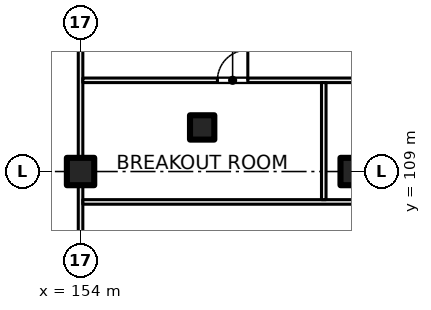
"""IFC4 building model, lengths in metres.
Left out: names, types, materials, properties, quantities, classifications, styles, units other than length and angle.
Written with IfcOpenShell. Run it as: python <this file> out.ifc"""

import sys

from ifc_helpers import new_model, si_unit, direction, frame, frame_2d, origin, origin_2d, place, context, subcontext, project, spatial, rectangle, extrude, element, fill, save


model = new_model("IFC4")
c1 = context("Model", 3, precision=1e-05, world=origin(), true_north=direction((0.0, 1.0)))
c2 = subcontext(c1, "Body", "Model", "MODEL_VIEW")
j1 = project(units=[si_unit("LENGTHUNIT", "METRE"), si_unit("PLANEANGLEUNIT", "RADIAN")], contexts=[c1])
p1 = place(None, origin())
s1 = spatial("IfcSite", under=j1, at=p1, CompositionType="ELEMENT")
p2 = place(p1, origin())
s2 = spatial("IfcBuilding", under=s1, at=p2, CompositionType="ELEMENT")
p3 = place(p2, frame((0.0, 0.0, 22.5)))
s3 = spatial("IfcBuildingStorey", under=s2, at=p3, CompositionType="ELEMENT", Elevation=22.5)
for number, where, z_axis, x_axis in (
    (1, (154.0, 109.0, 0.0), (0.0, 0.0, 1.0), (1.0, 0.0, 0.0)),
    (2, (163.0, 109.0, 0.0), (0.0, 0.0, 1.0), (1.0, 0.0, 0.0)),
):
    element("IfcColumn", number, at=place(p3, frame(where, z_axis=z_axis, x_axis=x_axis)), inside=s3, PredefinedType="COLUMN", context=c2, shape_type="SweptSolid", body=[
        extrude(rectangle(XDim=0.9, YDim=0.9, at=origin_2d()), origin(), (0.0, 0.0, 1.0), 5.0),
    ])
p4 = place(p3, frame((158.0, 110.45, 0.0), z_axis=(0.0, 0.0, 1.0), x_axis=(1.0, 0.0, 0.0)))
e3 = element("IfcColumn", 3, at=p4, inside=s3, PredefinedType="COLUMN", context=c2, shape_type="SweptSolid", body=[
    extrude(rectangle(XDim=0.8, YDim=0.8, at=origin_2d()), origin(), (0.0, 0.0, 1.0), 5.0),
])
p5 = place(p3, frame((154.0, 103.075, 0.0), z_axis=(0.0, 0.0, 1.0), x_axis=(0.0, 1.0, 0.0)))
e4 = element("IfcWall", 4, at=p5, inside=s3, PredefinedType="PARTITIONING", context=c2, shape_type="SweptSolid", body=[
    extrude(rectangle(XDim=13.925, YDim=0.15, at=frame_2d((6.962, 0.0))), origin(), (0.0, 0.0, 1.0), 4.625),
])
p6 = place(p3, frame((154.075, 108.0, 0.0), z_axis=(0.0, 0.0, 1.0), x_axis=(1.0, 0.0, 0.0)))
e5 = element("IfcWall", 5, at=p6, inside=s3, PredefinedType="PARTITIONING", context=c2, shape_type="SweptSolid", body=[
    extrude(rectangle(XDim=18.557, YDim=0.15, at=frame_2d((9.279, 0.0))), origin(), (0.0, 0.0, 1.0), 4.625),
])
p7 = place(p3, frame((167.002, 112.0, 0.0), z_axis=(0.0, 0.0, 1.0), x_axis=(-1.0, 0.0, 0.0)))
e6 = element("IfcWall", 6, at=p7, inside=s3, PredefinedType="PARTITIONING", context=c2, shape_type="SweptSolid", body=[
    extrude(rectangle(XDim=12.927, YDim=0.15, at=frame_2d((6.463, 0.0))), origin(), (0.0, 0.0, 1.0), 4.625),
])
p8 = place(p7, frame((7.5, 0.0, 0.0)))
e7 = element("IfcOpeningElement", 7, at=p8, cuts=e6, PredefinedType="OPENING", context=c2, shape_type="SweptSolid", body=[
    extrude(rectangle(XDim=1.0, YDim=2.1, at=frame_2d((0.5, 1.05))), frame((0.0, 0.085, 0.0), z_axis=(0.0, -1.0, 0.0), x_axis=(1.0, 0.0, 0.0)), (0.0, 0.0, 1.0), 0.17),
])
p9 = place(p3, frame((162.0, 108.075, 0.0), z_axis=(0.0, 0.0, 1.0), x_axis=(0.0, 1.0, 0.0)))
e8 = element("IfcWall", 8, at=p9, inside=s3, PredefinedType="PARTITIONING", context=c2, shape_type="SweptSolid", body=[
    extrude(rectangle(XDim=3.85, YDim=0.15, at=frame_2d((1.925, 0.0))), origin(), (0.0, 0.0, 1.0), 4.625),
])
p10 = place(p8, origin())
e9 = element("IfcDoor", 9, at=p10, inside=s3, OperationType="SINGLE_SWING_LEFT", PredefinedType="DOOR", context=c2, shape_type="SweptSolid", body=[
    extrude(rectangle(XDim=1.0, YDim=2.1, at=frame_2d((0.5, 1.05))), frame((0.0, 0.025, 0.0), z_axis=(0.0, -1.0, 0.0), x_axis=(1.0, 0.0, 0.0)), (0.0, 0.0, 1.0), 0.05),
])
fill(e7, e9)
save(model, sys.argv[1])
